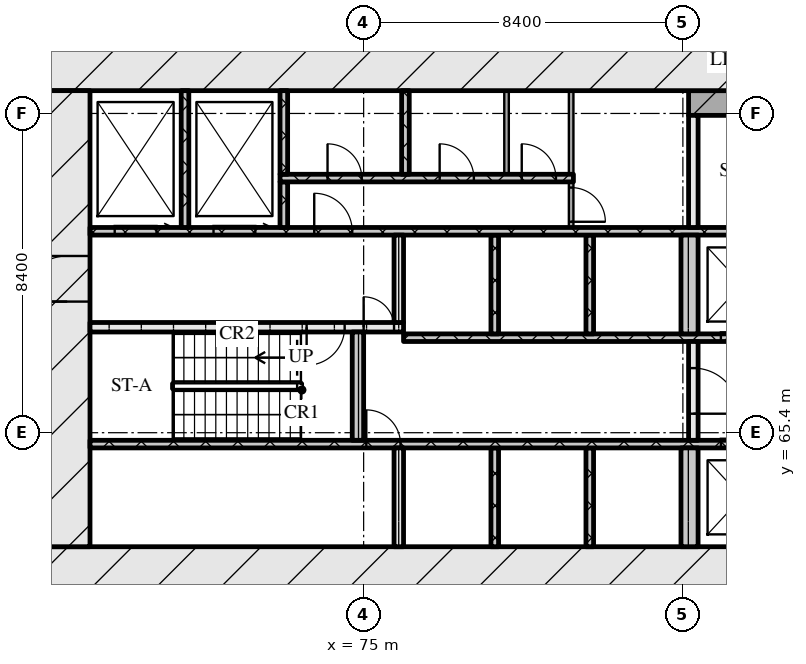
"""IFC4 building model, lengths in metres.
Left out: names, types, materials, properties, quantities, classifications, styles, units other than length and angle.
Written with IfcOpenShell. Run it as: python <this file> out.ifc"""

import sys

from ifc_helpers import new_model, si_unit, direction, frame, frame_2d, origin, place, context, subcontext, project, spatial, rectangle, extrude, element, fill, save


model = new_model("IFC4")
c1 = context("Model", 3, precision=1e-05, world=origin(), true_north=direction((0.0, 1.0)))
c2 = subcontext(c1, "Body", "Model", "MODEL_VIEW")
j1 = project(units=[si_unit("LENGTHUNIT", "METRE"), si_unit("PLANEANGLEUNIT", "RADIAN")], contexts=[c1])
p1 = place(None, origin())
s1 = spatial("IfcSite", under=j1, at=p1, CompositionType="ELEMENT")
p2 = place(p1, origin())
s2 = spatial("IfcBuilding", under=s1, at=p2, CompositionType="ELEMENT")
p3 = place(p2, frame((0.0, 0.0, 14.4)))
s3 = spatial("IfcBuildingStorey", under=s2, at=p3, CompositionType="ELEMENT", Elevation=14.4)
p4 = place(p3, frame((66.6, 61.8, 0.0), z_axis=(0.0, 0.0, 1.0), x_axis=(1.0, 0.0, 0.0)))
e1 = element("IfcWall", 1, at=p4, inside=s3, PredefinedType="SOLIDWALL", context=c2, shape_type="SweptSolid", body=[
    extrude(rectangle(XDim=42.0, YDim=1.2, at=frame_2d((21.0, 0.0))), origin(), (0.0, 0.0, 1.0), 4.5),
])
p5 = place(p4, frame((21.35, 0.0, 0.0)))
e2 = element("IfcOpeningElement", 2, at=p5, cuts=e1, PredefinedType="OPENING", context=c2, shape_type="SweptSolid", body=[
    extrude(rectangle(XDim=1.8, YDim=2.1, at=frame_2d((0.9, 1.05))), frame((0.0, 0.61, 0.0), z_axis=(0.0, -1.0, 0.0), x_axis=(1.0, 0.0, 0.0)), (0.0, 0.0, 1.0), 1.22),
])
p6 = place(p3, frame((66.6, 75.0, 0.0), z_axis=(0.0, 0.0, 1.0), x_axis=(1.0, 0.0, 0.0)))
e3 = element("IfcWall", 3, at=p6, inside=s3, PredefinedType="SOLIDWALL", context=c2, shape_type="SweptSolid", body=[
    extrude(rectangle(XDim=42.0, YDim=1.2, at=frame_2d((21.0, 0.0))), origin(), (0.0, 0.0, 1.0), 4.5),
])
p7 = place(p3, frame((67.2, 62.4, 0.0), z_axis=(0.0, 0.0, 1.0), x_axis=(0.0, 1.0, 0.0)))
e4 = element("IfcWall", 4, at=p7, inside=s3, PredefinedType="SOLIDWALL", context=c2, shape_type="SweptSolid", body=[
    extrude(rectangle(XDim=12.0, YDim=1.2, at=frame_2d((6.0, 0.0))), origin(), (0.0, 0.0, 1.0), 4.5),
])
p8 = place(p7, frame((6.45, 0.0, 0.0)))
e5 = element("IfcOpeningElement", 5, at=p8, cuts=e4, PredefinedType="OPENING", context=c2, shape_type="SweptSolid", body=[
    extrude(rectangle(XDim=1.2, YDim=2.1, at=frame_2d((0.6, 1.05))), frame((0.0, 0.61, 0.0), z_axis=(0.0, -1.0, 0.0), x_axis=(1.0, 0.0, 0.0)), (0.0, 0.0, 1.0), 1.22),
])
p9 = place(p3, frame((75.925, 62.4, 0.0), z_axis=(0.0, 0.0, 1.0), x_axis=(0.0, 1.0, 0.0)))
e6 = element("IfcWall", 6, at=p9, inside=s3, PredefinedType="SOLIDWALL", context=c2, shape_type="SweptSolid", body=[
    extrude(rectangle(XDim=2.6, YDim=0.25, at=frame_2d((1.3, 0.0))), origin(), (0.0, 0.0, 1.0), 4.5),
])
for number, where, z_axis, x_axis in (
    (7, (78.45, 62.4, 0.0), (0.0, 0.0, 1.0), (0.0, 1.0, 0.0)),
    (8, (80.95, 62.4, 0.0), (0.0, 0.0, 1.0), (0.0, 1.0, 0.0)),
):
    element("IfcWall", number, at=place(p3, frame(where, z_axis=z_axis, x_axis=x_axis)), inside=s3, PredefinedType="SOLIDWALL", context=c2, shape_type="SweptSolid", body=[
        extrude(rectangle(XDim=2.6, YDim=0.2, at=frame_2d((1.3, 0.0))), origin(), (0.0, 0.0, 1.0), 4.5),
    ])
p10 = place(p3, frame((83.575, 62.4, 0.0), z_axis=(0.0, 0.0, 1.0), x_axis=(0.0, 1.0, 0.0)))
e9 = element("IfcWall", 9, at=p10, inside=s3, PredefinedType="SOLIDWALL", context=c2, shape_type="SweptSolid", body=[
    extrude(rectangle(XDim=2.6, YDim=0.45, at=frame_2d((1.3, 0.0))), origin(), (0.0, 0.0, 1.0), 4.5),
])
p11 = place(p3, frame((67.8, 65.1, 0.0), z_axis=(0.0, 0.0, 1.0), x_axis=(1.0, 0.0, 0.0)))
e10 = element("IfcWall", 10, at=p11, inside=s3, PredefinedType="SOLIDWALL", context=c2, shape_type="SweptSolid", body=[
    extrude(rectangle(XDim=18.5, YDim=0.2, at=frame_2d((9.25, 0.0))), origin(), (0.0, 0.0, 1.0), 4.5),
])
p12 = place(p11, frame((7.27, 0.0, 0.0)))
e11 = element("IfcOpeningElement", 11, at=p12, cuts=e10, PredefinedType="OPENING", context=c2, shape_type="SweptSolid", body=[
    extrude(rectangle(XDim=0.9, YDim=2.1, at=frame_2d((0.45, 1.05))), frame((0.0, 0.11, 0.0), z_axis=(0.0, -1.0, 0.0), x_axis=(1.0, 0.0, 0.0)), (0.0, 0.0, 1.0), 0.22),
])
p13 = place(p11, frame((16.6, 0.0, 0.0)))
e12 = element("IfcOpeningElement", 12, at=p13, cuts=e10, PredefinedType="OPENING", context=c2, shape_type="SweptSolid", body=[
    extrude(rectangle(XDim=1.1, YDim=2.1, at=frame_2d((0.55, 1.05))), frame((0.0, 0.11, 0.0), z_axis=(0.0, -1.0, 0.0), x_axis=(1.0, 0.0, 0.0)), (0.0, 0.0, 1.0), 0.22),
])
p14 = place(p3, frame((74.85, 65.2, 0.0), z_axis=(0.0, 0.0, 1.0), x_axis=(0.0, 1.0, 0.0)))
e13 = element("IfcWall", 13, at=p14, inside=s3, PredefinedType="SOLIDWALL", context=c2, shape_type="SweptSolid", body=[
    extrude(rectangle(XDim=2.85, YDim=0.3, at=frame_2d((1.425, 0.0))), origin(), (0.0, 0.0, 1.0), 4.5),
])
p15 = place(p3, frame((83.675, 65.2, 0.0), z_axis=(0.0, 0.0, 1.0), x_axis=(0.0, 1.0, 0.0)))
e14 = element("IfcWall", 14, at=p15, inside=s3, PredefinedType="SOLIDWALL", context=c2, shape_type="SweptSolid", body=[
    extrude(rectangle(XDim=2.6, YDim=0.25, at=frame_2d((1.3, 0.0))), origin(), (0.0, 0.0, 1.0), 4.5),
])
p16 = place(p15, frame((0.7, 0.0, 0.0)))
e15 = element("IfcOpeningElement", 15, at=p16, cuts=e14, PredefinedType="OPENING", context=c2, shape_type="SweptSolid", body=[
    extrude(rectangle(XDim=1.2, YDim=2.1, at=frame_2d((0.6, 1.05))), frame((0.0, 0.135, 0.0), z_axis=(0.0, -1.0, 0.0), x_axis=(1.0, 0.0, 0.0)), (0.0, 0.0, 1.0), 0.27),
])
p17 = place(p3, frame((76.05, 67.9, 0.0), z_axis=(0.0, 0.0, 1.0), x_axis=(1.0, 0.0, 0.0)))
e16 = element("IfcWall", 16, at=p17, inside=s3, PredefinedType="SOLIDWALL", context=c2, shape_type="SweptSolid", body=[
    extrude(rectangle(XDim=23.1, YDim=0.2, at=frame_2d((11.55, 0.0))), origin(), (0.0, 0.0, 1.0), 4.5),
])
p18 = place(p17, frame((8.35, 0.0, 0.0)))
e17 = element("IfcOpeningElement", 17, at=p18, cuts=e16, PredefinedType="OPENING", context=c2, shape_type="SweptSolid", body=[
    extrude(rectangle(XDim=1.1, YDim=2.1, at=frame_2d((0.55, 1.05))), frame((0.0, 0.11, 0.0), z_axis=(0.0, -1.0, 0.0), x_axis=(1.0, 0.0, 0.0)), (0.0, 0.0, 1.0), 0.22),
])
p19 = place(p17, frame((10.85, 0.0, 0.0)))
e18 = element("IfcOpeningElement", 18, at=p19, cuts=e16, PredefinedType="OPENING", context=c2, shape_type="SweptSolid", body=[
    extrude(rectangle(XDim=1.1, YDim=2.1, at=frame_2d((0.55, 1.05))), frame((0.0, 0.11, 0.0), z_axis=(0.0, -1.0, 0.0), x_axis=(1.0, 0.0, 0.0)), (0.0, 0.0, 1.0), 0.22),
])
p20 = place(p17, frame((13.55, 0.0, 0.0)))
e19 = element("IfcOpeningElement", 19, at=p20, cuts=e16, PredefinedType="OPENING", context=c2, shape_type="SweptSolid", body=[
    extrude(rectangle(XDim=1.0, YDim=2.1, at=frame_2d((0.5, 1.05))), frame((0.0, 0.11, 0.0), z_axis=(0.0, -1.0, 0.0), x_axis=(1.0, 0.0, 0.0)), (0.0, 0.0, 1.0), 0.22),
])
for number, where, z_axis, x_axis in (
    (20, (78.45, 68.0, 0.0), (0.0, 0.0, 1.0), (0.0, 1.0, 0.0)),
    (21, (80.95, 68.0, 0.0), (0.0, 0.0, 1.0), (0.0, 1.0, 0.0)),
):
    element("IfcWall", number, at=place(p3, frame(where, z_axis=z_axis, x_axis=x_axis)), inside=s3, PredefinedType="SOLIDWALL", context=c2, shape_type="SweptSolid", body=[
        extrude(rectangle(XDim=2.6, YDim=0.2, at=frame_2d((1.3, 0.0))), origin(), (0.0, 0.0, 1.0), 4.5),
    ])
p21 = place(p3, frame((83.575, 68.0, 0.0), z_axis=(0.0, 0.0, 1.0), x_axis=(0.0, 1.0, 0.0)))
e22 = element("IfcWall", 22, at=p21, inside=s3, PredefinedType="SOLIDWALL", context=c2, shape_type="SweptSolid", body=[
    extrude(rectangle(XDim=2.6, YDim=0.45, at=frame_2d((1.3, 0.0))), origin(), (0.0, 0.0, 1.0), 4.5),
])
p22 = place(p3, frame((67.8, 68.175, 0.0), z_axis=(0.0, 0.0, 1.0), x_axis=(1.0, 0.0, 0.0)))
e23 = element("IfcWall", 23, at=p22, inside=s3, PredefinedType="SOLIDWALL", context=c2, shape_type="SweptSolid", body=[
    extrude(rectangle(XDim=8.25, YDim=0.25, at=frame_2d((4.125, 0.0))), origin(), (0.0, 0.0, 1.0), 4.5),
])
p23 = place(p22, frame((5.7, 0.0, 0.0)))
e24 = element("IfcOpeningElement", 24, at=p23, cuts=e23, PredefinedType="OPENING", context=c2, shape_type="SweptSolid", body=[
    extrude(rectangle(XDim=1.0, YDim=2.1, at=frame_2d((0.5, 1.05))), frame((0.0, 0.135, 0.0), z_axis=(0.0, -1.0, 0.0), x_axis=(1.0, 0.0, 0.0)), (0.0, 0.0, 1.0), 0.27),
])
p24 = place(p22, frame((7.2, 0.0, 0.0)))
e25 = element("IfcOpeningElement", 25, at=p24, cuts=e23, PredefinedType="OPENING", context=c2, shape_type="SweptSolid", body=[
    extrude(rectangle(XDim=0.8, YDim=2.1, at=frame_2d((0.4, 1.05))), frame((0.0, 0.135, 0.0), z_axis=(0.0, -1.0, 0.0), x_axis=(1.0, 0.0, 0.0)), (0.0, 0.0, 1.0), 0.27),
])
p25 = place(p3, frame((75.925, 68.3, 0.0), z_axis=(0.0, 0.0, 1.0), x_axis=(0.0, 1.0, 0.0)))
e26 = element("IfcWall", 26, at=p25, inside=s3, PredefinedType="SOLIDWALL", context=c2, shape_type="SweptSolid", body=[
    extrude(rectangle(XDim=2.3, YDim=0.25, at=frame_2d((1.15, 0.0))), origin(), (0.0, 0.0, 1.0), 4.5),
])
p26 = place(p3, frame((67.8, 70.7, 0.0), z_axis=(0.0, 0.0, 1.0), x_axis=(1.0, 0.0, 0.0)))
e27 = element("IfcWall", 27, at=p26, inside=s3, PredefinedType="SOLIDWALL", context=c2, shape_type="SweptSolid", body=[
    extrude(rectangle(XDim=39.6, YDim=0.2, at=frame_2d((19.8, 0.0))), origin(), (0.0, 0.0, 1.0), 4.5),
])
p27 = place(p26, frame((0.65, 0.0, 0.0)))
e28 = element("IfcOpeningElement", 28, at=p27, cuts=e27, PredefinedType="OPENING", context=c2, shape_type="SweptSolid", body=[
    extrude(rectangle(XDim=1.1, YDim=2.1, at=frame_2d((0.55, 1.05))), frame((0.0, 0.11, 0.0), z_axis=(0.0, -1.0, 0.0), x_axis=(1.0, 0.0, 0.0)), (0.0, 0.0, 1.0), 0.22),
])
p28 = place(p26, frame((3.25, 0.0, 0.0)))
e29 = element("IfcOpeningElement", 29, at=p28, cuts=e27, PredefinedType="OPENING", context=c2, shape_type="SweptSolid", body=[
    extrude(rectangle(XDim=1.1, YDim=2.1, at=frame_2d((0.55, 1.05))), frame((0.0, 0.11, 0.0), z_axis=(0.0, -1.0, 0.0), x_axis=(1.0, 0.0, 0.0)), (0.0, 0.0, 1.0), 0.22),
])
p29 = place(p26, frame((5.9, 0.0, 0.0)))
e30 = element("IfcOpeningElement", 30, at=p29, cuts=e27, PredefinedType="OPENING", context=c2, shape_type="SweptSolid", body=[
    extrude(rectangle(XDim=1.0, YDim=2.1, at=frame_2d((0.5, 1.05))), frame((0.0, 0.11, 0.0), z_axis=(0.0, -1.0, 0.0), x_axis=(1.0, 0.0, 0.0)), (0.0, 0.0, 1.0), 0.22),
])
p30 = place(p26, frame((21.7, 0.0, 0.0)))
e31 = element("IfcOpeningElement", 31, at=p30, cuts=e27, PredefinedType="OPENING", context=c2, shape_type="SweptSolid", body=[
    extrude(rectangle(XDim=1.0, YDim=2.1, at=frame_2d((0.5, 1.05))), frame((0.0, 0.11, 0.0), z_axis=(0.0, -1.0, 0.0), x_axis=(1.0, 0.0, 0.0)), (0.0, 0.0, 1.0), 0.22),
])
p31 = place(p26, frame((32.7, 0.0, 0.0)))
e32 = element("IfcOpeningElement", 32, at=p31, cuts=e27, PredefinedType="OPENING", context=c2, shape_type="SweptSolid", body=[
    extrude(rectangle(XDim=1.0, YDim=2.1, at=frame_2d((0.5, 1.05))), frame((0.0, 0.11, 0.0), z_axis=(0.0, -1.0, 0.0), x_axis=(1.0, 0.0, 0.0)), (0.0, 0.0, 1.0), 0.22),
])
p32 = place(p26, frame((35.25, 0.0, 0.0)))
e33 = element("IfcOpeningElement", 33, at=p32, cuts=e27, PredefinedType="OPENING", context=c2, shape_type="SweptSolid", body=[
    extrude(rectangle(XDim=1.1, YDim=2.1, at=frame_2d((0.55, 1.05))), frame((0.0, 0.11, 0.0), z_axis=(0.0, -1.0, 0.0), x_axis=(1.0, 0.0, 0.0)), (0.0, 0.0, 1.0), 0.22),
])
p33 = place(p26, frame((37.85, 0.0, 0.0)))
e34 = element("IfcOpeningElement", 34, at=p33, cuts=e27, PredefinedType="OPENING", context=c2, shape_type="SweptSolid", body=[
    extrude(rectangle(XDim=1.1, YDim=2.1, at=frame_2d((0.55, 1.05))), frame((0.0, 0.11, 0.0), z_axis=(0.0, -1.0, 0.0), x_axis=(1.0, 0.0, 0.0)), (0.0, 0.0, 1.0), 0.22),
])
p34 = place(p3, frame((70.3, 70.8, 0.0), z_axis=(0.0, 0.0, 1.0), x_axis=(0.0, 1.0, 0.0)))
e35 = element("IfcWall", 35, at=p34, inside=s3, PredefinedType="SOLIDWALL", context=c2, shape_type="SweptSolid", body=[
    extrude(rectangle(XDim=3.6, YDim=0.2, at=frame_2d((1.8, 0.0))), origin(), (0.0, 0.0, 1.0), 4.5),
])
p35 = place(p3, frame((72.9, 70.8, 0.0), z_axis=(0.0, 0.0, 1.0), x_axis=(0.0, 1.0, 0.0)))
e36 = element("IfcWall", 36, at=p35, inside=s3, PredefinedType="SOLIDWALL", context=c2, shape_type="SweptSolid", body=[
    extrude(rectangle(XDim=1.2, YDim=0.2, at=frame_2d((0.6, 0.0))), origin(), (0.0, 0.0, 1.0), 4.5),
])
p36 = place(p3, frame((80.46, 70.8, 0.0), z_axis=(0.0, 0.0, 1.0), x_axis=(0.0, 1.0, 0.0)))
e37 = element("IfcWall", 37, at=p36, inside=s3, PredefinedType="PARTITIONING", context=c2, shape_type="SweptSolid", body=[
    extrude(rectangle(XDim=1.2, YDim=0.12, at=frame_2d((0.6, 0.0))), origin(), (0.0, 0.0, 1.0), 4.5),
])
p37 = place(p36, frame((0.15, 0.0, 0.0)))
e38 = element("IfcOpeningElement", 38, at=p37, cuts=e37, PredefinedType="OPENING", context=c2, shape_type="SweptSolid", body=[
    extrude(rectangle(XDim=0.9, YDim=2.1, at=frame_2d((0.45, 1.05))), frame((0.0, 0.07, 0.0), z_axis=(0.0, -1.0, 0.0), x_axis=(1.0, 0.0, 0.0)), (0.0, 0.0, 1.0), 0.14),
])
p38 = place(p3, frame((83.675, 70.8, 0.0), z_axis=(0.0, 0.0, 1.0), x_axis=(0.0, 1.0, 0.0)))
e39 = element("IfcWall", 39, at=p38, inside=s3, PredefinedType="SOLIDWALL", context=c2, shape_type="SweptSolid", body=[
    extrude(rectangle(XDim=2.95, YDim=0.25, at=frame_2d((1.475, 0.0))), origin(), (0.0, 0.0, 1.0), 4.5),
])
p39 = place(p3, frame((72.8, 72.1, 0.0), z_axis=(0.0, 0.0, 1.0), x_axis=(1.0, 0.0, 0.0)))
e40 = element("IfcWall", 40, at=p39, inside=s3, PredefinedType="SOLIDWALL", context=c2, shape_type="SweptSolid", body=[
    extrude(rectangle(XDim=7.72, YDim=0.2, at=frame_2d((3.86, 0.0))), origin(), (0.0, 0.0, 1.0), 4.5),
])
p40 = place(p39, frame((1.25, 0.0, 0.0)))
e41 = element("IfcOpeningElement", 41, at=p40, cuts=e40, PredefinedType="OPENING", context=c2, shape_type="SweptSolid", body=[
    extrude(rectangle(XDim=0.9, YDim=2.1, at=frame_2d((0.45, 1.05))), frame((0.0, 0.11, 0.0), z_axis=(0.0, -1.0, 0.0), x_axis=(1.0, 0.0, 0.0)), (0.0, 0.0, 1.0), 0.22),
])
p41 = place(p39, frame((4.2, 0.0, 0.0)))
e42 = element("IfcOpeningElement", 42, at=p41, cuts=e40, PredefinedType="OPENING", context=c2, shape_type="SweptSolid", body=[
    extrude(rectangle(XDim=0.9, YDim=2.1, at=frame_2d((0.45, 1.05))), frame((0.0, 0.11, 0.0), z_axis=(0.0, -1.0, 0.0), x_axis=(1.0, 0.0, 0.0)), (0.0, 0.0, 1.0), 0.22),
])
p42 = place(p39, frame((6.36, 0.0, 0.0)))
e43 = element("IfcOpeningElement", 43, at=p42, cuts=e40, PredefinedType="OPENING", context=c2, shape_type="SweptSolid", body=[
    extrude(rectangle(XDim=0.9, YDim=2.1, at=frame_2d((0.45, 1.05))), frame((0.0, 0.11, 0.0), z_axis=(0.0, -1.0, 0.0), x_axis=(1.0, 0.0, 0.0)), (0.0, 0.0, 1.0), 0.22),
])
for number, where, z_axis, x_axis in (
    (44, (72.9, 72.2, 0.0), (0.0, 0.0, 1.0), (0.0, 1.0, 0.0)),
    (45, (76.1, 72.2, 0.0), (0.0, 0.0, 1.0), (0.0, 1.0, 0.0)),
):
    element("IfcWall", number, at=place(p3, frame(where, z_axis=z_axis, x_axis=x_axis)), inside=s3, PredefinedType="SOLIDWALL", context=c2, shape_type="SweptSolid", body=[
        extrude(rectangle(XDim=2.2, YDim=0.2, at=frame_2d((1.1, 0.0))), origin(), (0.0, 0.0, 1.0), 4.5),
    ])
for number, where, z_axis, x_axis in (
    (46, (78.76, 72.2, 0.0), (0.0, 0.0, 1.0), (0.0, 1.0, 0.0)),
    (47, (80.46, 72.2, 0.0), (0.0, 0.0, 1.0), (0.0, 1.0, 0.0)),
):
    element("IfcWall", number, at=place(p3, frame(where, z_axis=z_axis, x_axis=x_axis)), inside=s3, PredefinedType="PARTITIONING", context=c2, shape_type="SweptSolid", body=[
        extrude(rectangle(XDim=2.2, YDim=0.12, at=frame_2d((1.1, 0.0))), origin(), (0.0, 0.0, 1.0), 4.5),
    ])
p43 = place(p3, frame((83.55, 74.075, 0.0), z_axis=(0.0, 0.0, 1.0), x_axis=(1.0, 0.0, 0.0)))
e48 = element("IfcWall", 48, at=p43, inside=s3, PredefinedType="SOLIDWALL", context=c2, shape_type="SweptSolid", body=[
    extrude(rectangle(XDim=8.1, YDim=0.65, at=frame_2d((4.05, 0.0))), origin(), (0.0, 0.0, 1.0), 4.5),
])
p44 = place(p12, origin())
e49 = element("IfcDoor", 49, at=p44, inside=s3, OperationType="SINGLE_SWING_LEFT", PredefinedType="DOOR", context=c2, shape_type="SweptSolid", body=[
    extrude(rectangle(XDim=0.9, YDim=2.1, at=frame_2d((0.45, 1.05))), frame((0.0, 0.025, 0.0), z_axis=(0.0, -1.0, 0.0), x_axis=(1.0, 0.0, 0.0)), (0.0, 0.0, 1.0), 0.05),
])
fill(e11, e49)
p45 = place(p13, origin())
e50 = element("IfcDoor", 50, at=p45, inside=s3, OperationType="SLIDING_TO_LEFT", PredefinedType="DOOR", context=c2, shape_type="SweptSolid", body=[
    extrude(rectangle(XDim=1.1, YDim=2.1, at=frame_2d((0.55, 1.05))), frame((0.0, 0.025, 0.0), z_axis=(0.0, -1.0, 0.0), x_axis=(1.0, 0.0, 0.0)), (0.0, 0.0, 1.0), 0.05),
])
fill(e12, e50)
p46 = place(p16, origin())
e51 = element("IfcDoor", 51, at=p46, inside=s3, OperationType="SINGLE_SWING_RIGHT", PredefinedType="DOOR", context=c2, shape_type="SweptSolid", body=[
    extrude(rectangle(XDim=1.2, YDim=2.1, at=frame_2d((0.6, 1.05))), frame((0.0, 0.025, 0.0), z_axis=(0.0, -1.0, 0.0), x_axis=(1.0, 0.0, 0.0)), (0.0, 0.0, 1.0), 0.05),
])
fill(e15, e51)
p47 = place(p18, origin())
e52 = element("IfcDoor", 52, at=p47, inside=s3, OperationType="SLIDING_TO_RIGHT", PredefinedType="DOOR", context=c2, shape_type="SweptSolid", body=[
    extrude(rectangle(XDim=1.1, YDim=2.1, at=frame_2d((0.55, 1.05))), frame((0.0, 0.025, 0.0), z_axis=(0.0, -1.0, 0.0), x_axis=(1.0, 0.0, 0.0)), (0.0, 0.0, 1.0), 0.05),
])
fill(e17, e52)
p48 = place(p23, origin())
e53 = element("IfcDoor", 53, at=p48, inside=s3, OperationType="SINGLE_SWING_RIGHT", PredefinedType="DOOR", context=c2, shape_type="SweptSolid", body=[
    extrude(rectangle(XDim=1.0, YDim=2.1, at=frame_2d((0.5, 1.05))), frame((0.0, 0.025, 0.0), z_axis=(0.0, -1.0, 0.0), x_axis=(1.0, 0.0, 0.0)), (0.0, 0.0, 1.0), 0.05),
])
fill(e24, e53)
p49 = place(p24, origin())
e54 = element("IfcDoor", 54, at=p49, inside=s3, OperationType="SINGLE_SWING_LEFT", PredefinedType="DOOR", context=c2, shape_type="SweptSolid", body=[
    extrude(rectangle(XDim=0.8, YDim=2.1, at=frame_2d((0.4, 1.05))), frame((0.0, 0.025, 0.0), z_axis=(0.0, -1.0, 0.0), x_axis=(1.0, 0.0, 0.0)), (0.0, 0.0, 1.0), 0.05),
])
fill(e25, e54)
p50 = place(p8, origin())
e55 = element("IfcDoor", 55, at=p50, inside=s3, OperationType="SINGLE_SWING_LEFT", PredefinedType="DOOR", context=c2, shape_type="SweptSolid", body=[
    extrude(rectangle(XDim=1.2, YDim=2.1, at=frame_2d((0.6, 1.05))), frame((0.0, 0.025, 0.0), z_axis=(0.0, -1.0, 0.0), x_axis=(1.0, 0.0, 0.0)), (0.0, 0.0, 1.0), 0.05),
])
fill(e5, e55)
p51 = place(p27, origin())
e56 = element("IfcDoor", 56, at=p51, inside=s3, OperationType="SLIDING_TO_RIGHT", PredefinedType="DOOR", context=c2, shape_type="SweptSolid", body=[
    extrude(rectangle(XDim=1.1, YDim=2.1, at=frame_2d((0.55, 1.05))), frame((0.0, 0.025, 0.0), z_axis=(0.0, -1.0, 0.0), x_axis=(1.0, 0.0, 0.0)), (0.0, 0.0, 1.0), 0.05),
])
fill(e28, e56)
p52 = place(p28, origin())
e57 = element("IfcDoor", 57, at=p52, inside=s3, OperationType="SLIDING_TO_RIGHT", PredefinedType="DOOR", context=c2, shape_type="SweptSolid", body=[
    extrude(rectangle(XDim=1.1, YDim=2.1, at=frame_2d((0.55, 1.05))), frame((0.0, 0.025, 0.0), z_axis=(0.0, -1.0, 0.0), x_axis=(1.0, 0.0, 0.0)), (0.0, 0.0, 1.0), 0.05),
])
fill(e29, e57)
p53 = place(p29, origin())
e58 = element("IfcDoor", 58, at=p53, inside=s3, OperationType="SINGLE_SWING_LEFT", PredefinedType="DOOR", context=c2, shape_type="SweptSolid", body=[
    extrude(rectangle(XDim=1.0, YDim=2.1, at=frame_2d((0.5, 1.05))), frame((0.0, 0.025, 0.0), z_axis=(0.0, -1.0, 0.0), x_axis=(1.0, 0.0, 0.0)), (0.0, 0.0, 1.0), 0.05),
])
fill(e30, e58)
p54 = place(p37, origin())
e59 = element("IfcDoor", 59, at=p54, inside=s3, OperationType="SINGLE_SWING_RIGHT", PredefinedType="DOOR", context=c2, shape_type="SweptSolid", body=[
    extrude(rectangle(XDim=0.9, YDim=2.1, at=frame_2d((0.45, 1.05))), frame((0.0, 0.025, 0.0), z_axis=(0.0, -1.0, 0.0), x_axis=(1.0, 0.0, 0.0)), (0.0, 0.0, 1.0), 0.05),
])
fill(e38, e59)
p55 = place(p40, origin())
e60 = element("IfcDoor", 60, at=p55, inside=s3, OperationType="SINGLE_SWING_LEFT", PredefinedType="DOOR", context=c2, shape_type="SweptSolid", body=[
    extrude(rectangle(XDim=0.9, YDim=2.1, at=frame_2d((0.45, 1.05))), frame((0.0, 0.025, 0.0), z_axis=(0.0, -1.0, 0.0), x_axis=(1.0, 0.0, 0.0)), (0.0, 0.0, 1.0), 0.05),
])
fill(e41, e60)
p56 = place(p41, origin())
e61 = element("IfcDoor", 61, at=p56, inside=s3, OperationType="SINGLE_SWING_LEFT", PredefinedType="DOOR", context=c2, shape_type="SweptSolid", body=[
    extrude(rectangle(XDim=0.9, YDim=2.1, at=frame_2d((0.45, 1.05))), frame((0.0, 0.025, 0.0), z_axis=(0.0, -1.0, 0.0), x_axis=(1.0, 0.0, 0.0)), (0.0, 0.0, 1.0), 0.05),
])
fill(e42, e61)
p57 = place(p42, origin())
e62 = element("IfcDoor", 62, at=p57, inside=s3, OperationType="SINGLE_SWING_LEFT", PredefinedType="DOOR", context=c2, shape_type="SweptSolid", body=[
    extrude(rectangle(XDim=0.9, YDim=2.1, at=frame_2d((0.45, 1.05))), frame((0.0, 0.025, 0.0), z_axis=(0.0, -1.0, 0.0), x_axis=(1.0, 0.0, 0.0)), (0.0, 0.0, 1.0), 0.05),
])
fill(e43, e62)
save(model, sys.argv[1])
